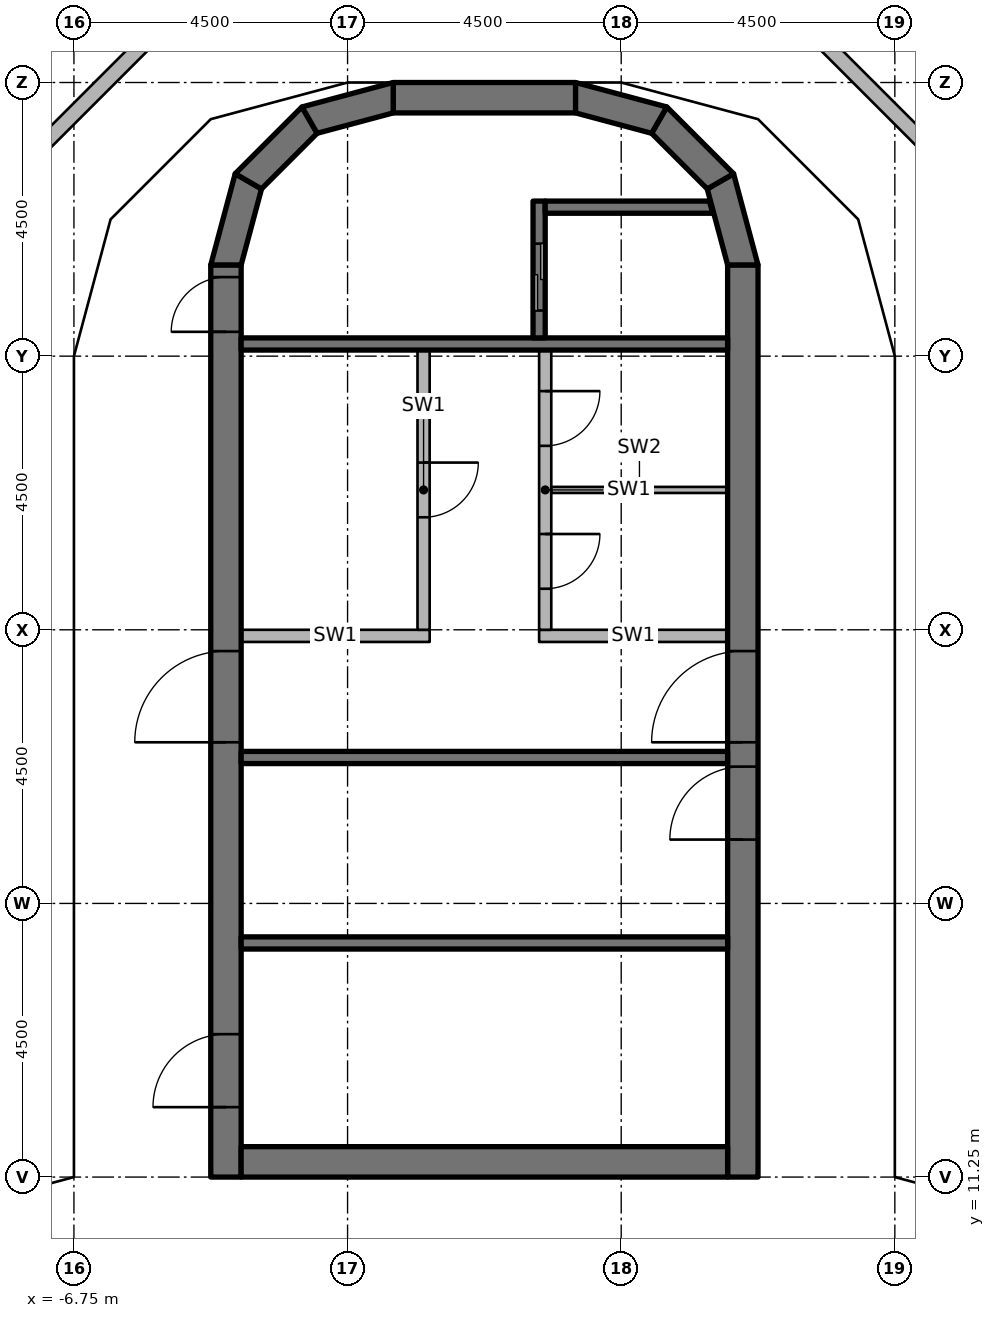
"""IFC4 building model, lengths in metres.
Left out: names, types, materials, properties, quantities, classifications, styles, units other than length and angle.
Written with IfcOpenShell. Run it as: python <this file> out.ifc"""

import sys

from ifc_helpers import new_model, si_unit, direction, frame, frame_2d, origin, origin_2d, place, context, subcontext, project, spatial, polyline, rectangle, outline, extrude, element, fill, save


model = new_model("IFC4")
c1 = context("Model", 3, precision=1e-05, world=origin(), true_north=direction((0.0, 1.0)))
c2 = subcontext(c1, "Body", "Model", "MODEL_VIEW")
j1 = project(units=[si_unit("LENGTHUNIT", "METRE"), si_unit("PLANEANGLEUNIT", "RADIAN")], contexts=[c1])
p1 = place(None, origin())
s1 = spatial("IfcSite", under=j1, at=p1, CompositionType="ELEMENT")
p2 = place(p1, origin())
s2 = spatial("IfcBuilding", under=s1, at=p2, CompositionType="ELEMENT")
p3 = place(p2, frame((0.0, 0.0, 298.8)))
s3 = spatial("IfcBuildingStorey", under=s2, at=p3, CompositionType="ELEMENT", Elevation=298.8)
for number, where, z_axis, x_axis in (
    (1, (-6.25, 10.75, 0.0), (0.0, 0.0, 1.0), (1.0, 0.0, 0.0)),
    (2, (-6.25, 15.75, 0.0), (0.0, 0.0, 1.0), (1.0, 0.0, 0.0)),
    (3, (-6.25, 20.25, 0.0), (0.0, 0.0, 1.0), (1.0, 0.0, 0.0)),
    (4, (-6.25, 24.65, 0.0), (0.0, 0.0, 1.0), (1.0, 0.0, 0.0)),
    (5, (6.25, 10.75, 0.0), (0.0, 0.0, 1.0), (1.0, 0.0, 0.0)),
    (6, (6.25, 15.75, 0.0), (0.0, 0.0, 1.0), (1.0, 0.0, 0.0)),
    (7, (6.25, 20.25, 0.0), (0.0, 0.0, 1.0), (1.0, 0.0, 0.0)),
    (8, (6.25, 24.65, 0.0), (0.0, 0.0, 1.0), (1.0, 0.0, 0.0)),
):
    element("IfcColumn", number, at=place(p3, frame(where, z_axis=z_axis, x_axis=x_axis)), inside=s3, PredefinedType="COLUMN", context=c2, shape_type="SweptSolid", body=[
        extrude(rectangle(XDim=0.6, YDim=0.6, at=origin_2d()), origin(), (0.0, 0.0, 1.0), 3.45),
    ])
p4 = place(p3, frame((-4.25, 11.25, 0.0), z_axis=(0.0, 0.0, 1.0), x_axis=(0.0, 1.0, 0.0)))
e9 = element("IfcWall", 9, at=p4, inside=s3, PredefinedType="SHEAR", context=c2, shape_type="SweptSolid", body=[
    extrude(rectangle(XDim=15.0, YDim=0.5, at=frame_2d((7.5, 0.0))), origin(), (0.0, 0.0, 1.0), 3.6),
])
p5 = place(p4, frame((7.15, 0.0, 0.0)))
e10 = element("IfcOpeningElement", 10, at=p5, cuts=e9, PredefinedType="OPENING", context=c2, shape_type="SweptSolid", body=[
    extrude(rectangle(XDim=1.5, YDim=2.3, at=frame_2d((0.75, 1.15))), frame((0.0, 0.26, 0.0), z_axis=(0.0, -1.0, 0.0), x_axis=(1.0, 0.0, 0.0)), (0.0, 0.0, 1.0), 0.52),
])
p6 = place(p4, frame((13.9, 0.0, 0.0)))
e11 = element("IfcOpeningElement", 11, at=p6, cuts=e9, PredefinedType="OPENING", context=c2, shape_type="SweptSolid", body=[
    extrude(rectangle(XDim=0.9, YDim=2.1, at=frame_2d((0.45, 1.05))), frame((0.0, 0.26, 0.0), z_axis=(0.0, -1.0, 0.0), x_axis=(1.0, 0.0, 0.0)), (0.0, 0.0, 1.0), 0.52),
])
p7 = place(p4, frame((1.15, 0.0, 0.0)))
e12 = element("IfcOpeningElement", 12, at=p7, cuts=e9, PredefinedType="OPENING", context=c2, shape_type="SweptSolid", body=[
    extrude(rectangle(XDim=1.2, YDim=2.1, at=frame_2d((0.6, 1.05))), frame((0.0, 0.26, 0.0), z_axis=(0.0, -1.0, 0.0), x_axis=(1.0, 0.0, 0.0)), (0.0, 0.0, 1.0), 0.52),
])
p8 = place(p3, frame((4.25, 11.25, 0.0), z_axis=(0.0, 0.0, 1.0), x_axis=(0.0, 1.0, 0.0)))
e13 = element("IfcWall", 13, at=p8, inside=s3, PredefinedType="SHEAR", context=c2, shape_type="SweptSolid", body=[
    extrude(rectangle(XDim=15.0, YDim=0.5, at=frame_2d((7.5, 0.0))), origin(), (0.0, 0.0, 1.0), 3.6),
])
p9 = place(p8, frame((7.15, 0.0, 0.0)))
e14 = element("IfcOpeningElement", 14, at=p9, cuts=e13, PredefinedType="OPENING", context=c2, shape_type="SweptSolid", body=[
    extrude(rectangle(XDim=1.5, YDim=2.3, at=frame_2d((0.75, 1.15))), frame((0.0, 0.26, 0.0), z_axis=(0.0, -1.0, 0.0), x_axis=(1.0, 0.0, 0.0)), (0.0, 0.0, 1.0), 0.52),
])
p10 = place(p8, frame((5.55, 0.0, 0.0)))
e15 = element("IfcOpeningElement", 15, at=p10, cuts=e13, PredefinedType="OPENING", context=c2, shape_type="SweptSolid", body=[
    extrude(rectangle(XDim=1.2, YDim=2.1, at=frame_2d((0.6, 1.05))), frame((0.0, 0.26, 0.0), z_axis=(0.0, -1.0, 0.0), x_axis=(1.0, 0.0, 0.0)), (0.0, 0.0, 1.0), 0.52),
])
p11 = place(p3, frame((-4.0, 11.5, 0.0), z_axis=(0.0, 0.0, 1.0), x_axis=(1.0, 0.0, 0.0)))
e16 = element("IfcWall", 16, at=p11, inside=s3, PredefinedType="SHEAR", context=c2, shape_type="SweptSolid", body=[
    extrude(rectangle(XDim=8.0, YDim=0.5, at=frame_2d((4.0, 0.0))), origin(), (0.0, 0.0, 1.0), 3.6),
])
p12 = place(p3, frame((-1.5, 29.0, 0.0), z_axis=(0.0, 0.0, 1.0), x_axis=(1.0, 0.0, 0.0)))
e17 = element("IfcWall", 17, at=p12, inside=s3, PredefinedType="SHEAR", context=c2, shape_type="SweptSolid", body=[
    extrude(rectangle(XDim=3.0, YDim=0.5, at=frame_2d((1.5, 0.0))), origin(), (0.0, 0.0, 1.0), 3.6),
])
p13 = place(p3, origin())
e18 = element("IfcWall", 18, at=p13, inside=s3, PredefinedType="SHEAR", context=c2, shape_type="SweptSolid", body=[
    extrude(outline(polyline([(-4.5, 26.25), (-4.098, 27.75), (-3.665, 27.5), (-4.0, 26.25), (-4.5, 26.25)])), origin(), (0.0, 0.0, 1.0), 3.6),
])
p14 = place(p3, origin())
e19 = element("IfcWall", 19, at=p14, inside=s3, PredefinedType="SHEAR", context=c2, shape_type="SweptSolid", body=[
    extrude(outline(polyline([(-4.098, 27.75), (-3.0, 28.848), (-2.75, 28.415), (-3.665, 27.5), (-4.098, 27.75)])), origin(), (0.0, 0.0, 1.0), 3.6),
])
p15 = place(p3, origin())
e20 = element("IfcWall", 20, at=p15, inside=s3, PredefinedType="SHEAR", context=c2, shape_type="SweptSolid", body=[
    extrude(outline(polyline([(-3.0, 28.848), (-1.5, 29.25), (-1.5, 28.75), (-2.75, 28.415), (-3.0, 28.848)])), origin(), (0.0, 0.0, 1.0), 3.6),
])
p16 = place(p3, origin())
e21 = element("IfcWall", 21, at=p16, inside=s3, PredefinedType="SHEAR", context=c2, shape_type="SweptSolid", body=[
    extrude(outline(polyline([(4.5, 26.25), (4.098, 27.75), (3.665, 27.5), (4.0, 26.25), (4.5, 26.25)])), origin(), (0.0, 0.0, 1.0), 3.6),
])
p17 = place(p3, origin())
e22 = element("IfcWall", 22, at=p17, inside=s3, PredefinedType="SHEAR", context=c2, shape_type="SweptSolid", body=[
    extrude(outline(polyline([(4.098, 27.75), (3.0, 28.848), (2.75, 28.415), (3.665, 27.5), (4.098, 27.75)])), origin(), (0.0, 0.0, 1.0), 3.6),
])
p18 = place(p3, origin())
e23 = element("IfcWall", 23, at=p18, inside=s3, PredefinedType="SHEAR", context=c2, shape_type="SweptSolid", body=[
    extrude(outline(polyline([(3.0, 28.848), (1.5, 29.25), (1.5, 28.75), (2.75, 28.415), (3.0, 28.848)])), origin(), (0.0, 0.0, 1.0), 3.6),
])
p19 = place(p3, origin())
e24 = element("IfcWall", 24, at=p19, inside=s3, PredefinedType="PARAPET", context=c2, shape_type="SweptSolid", body=[
    extrude(outline(polyline([(-7.743, 27.921), (-5.421, 30.243), (-5.292, 30.019), (-7.519, 27.792), (-7.743, 27.921)])), origin(), (0.0, 0.0, 1.0), 1.22),
])
p20 = place(p3, origin())
e25 = element("IfcWall", 25, at=p20, inside=s3, PredefinedType="PARAPET", context=c2, shape_type="SweptSolid", body=[
    extrude(outline(polyline([(5.421, 30.243), (7.743, 27.921), (7.519, 27.792), (5.292, 30.019), (5.421, 30.243)])), origin(), (0.0, 0.0, 1.0), 1.22),
])
p21 = place(p3, frame((-4.0, 24.95, 0.0), z_axis=(0.0, 0.0, 1.0), x_axis=(1.0, 0.0, 0.0)))
e26 = element("IfcWall", 26, at=p21, inside=s3, PredefinedType="SHEAR", context=c2, shape_type="SweptSolid", body=[
    extrude(rectangle(XDim=8.0, YDim=0.2, at=frame_2d((4.0, 0.0))), origin(), (0.0, 0.0, 1.0), 3.45),
])
p22 = place(p3, frame((0.9, 27.3, 0.0), z_axis=(0.0, 0.0, 1.0), x_axis=(0.0, -1.0, 0.0)))
e27 = element("IfcWall", 27, at=p22, inside=s3, PredefinedType="SHEAR", context=c2, shape_type="SweptSolid", body=[
    extrude(rectangle(XDim=2.25, YDim=0.2, at=frame_2d((1.125, 0.0))), origin(), (0.0, 0.0, 1.0), 3.45),
])
p23 = place(p22, frame((0.7, 0.0, 0.0)))
e28 = element("IfcOpeningElement", 28, at=p23, cuts=e27, PredefinedType="OPENING", context=c2, shape_type="SweptSolid", body=[
    extrude(rectangle(XDim=1.1, YDim=2.3, at=frame_2d((0.55, 1.15))), frame((0.0, 0.11, 0.0), z_axis=(0.0, -1.0, 0.0), x_axis=(1.0, 0.0, 0.0)), (0.0, 0.0, 1.0), 0.22),
])
p24 = place(p3, origin())
e29 = element("IfcWall", 29, at=p24, inside=s3, PredefinedType="SHEAR", context=c2, shape_type="SweptSolid", body=[
    extrude(outline(polyline([(1.0, 27.1), (3.755, 27.1), (3.701, 27.3), (1.0, 27.3), (1.0, 27.1)])), origin(), (0.0, 0.0, 1.0), 3.45),
])
for number, where, z_axis, x_axis in (
    (30, (-4.0, 18.15, 0.0), (0.0, 0.0, 1.0), (1.0, 0.0, 0.0)),
    (31, (-4.0, 15.1, 0.0), (0.0, 0.0, 1.0), (1.0, 0.0, 0.0)),
):
    element("IfcWall", number, at=place(p3, frame(where, z_axis=z_axis, x_axis=x_axis)), inside=s3, PredefinedType="SHEAR", context=c2, shape_type="SweptSolid", body=[
        extrude(rectangle(XDim=8.0, YDim=0.2, at=frame_2d((4.0, 0.0))), origin(), (0.0, 0.0, 1.0), 3.45),
    ])
p25 = place(p3, frame((-4.0, 20.15, 0.0), z_axis=(0.0, 0.0, 1.0), x_axis=(1.0, 0.0, 0.0)))
e32 = element("IfcWall", 32, at=p25, inside=s3, PredefinedType="PARTITIONING", context=c2, shape_type="SweptSolid", body=[
    extrude(rectangle(XDim=3.1, YDim=0.2, at=frame_2d((1.55, 0.0))), origin(), (0.0, 0.0, 1.0), 3.45),
])
p26 = place(p3, frame((-1.0, 24.85, 0.0), z_axis=(0.0, 0.0, 1.0), x_axis=(0.0, -1.0, 0.0)))
e33 = element("IfcWall", 33, at=p26, inside=s3, PredefinedType="PARTITIONING", context=c2, shape_type="SweptSolid", body=[
    extrude(rectangle(XDim=4.6, YDim=0.2, at=frame_2d((2.3, 0.0))), origin(), (0.0, 0.0, 1.0), 3.45),
])
p27 = place(p26, frame((1.85, 0.0, 0.0)))
e34 = element("IfcOpeningElement", 34, at=p27, cuts=e33, PredefinedType="OPENING", context=c2, shape_type="SweptSolid", body=[
    extrude(rectangle(XDim=0.9, YDim=2.1, at=frame_2d((0.45, 1.05))), frame((0.0, 0.11, 0.0), z_axis=(0.0, -1.0, 0.0), x_axis=(1.0, 0.0, 0.0)), (0.0, 0.0, 1.0), 0.22),
])
p28 = place(p3, frame((0.9, 20.15, 0.0), z_axis=(0.0, 0.0, 1.0), x_axis=(1.0, 0.0, 0.0)))
e35 = element("IfcWall", 35, at=p28, inside=s3, PredefinedType="PARTITIONING", context=c2, shape_type="SweptSolid", body=[
    extrude(rectangle(XDim=3.1, YDim=0.2, at=frame_2d((1.55, 0.0))), origin(), (0.0, 0.0, 1.0), 3.45),
])
p29 = place(p3, frame((1.0, 24.85, 0.0), z_axis=(0.0, 0.0, 1.0), x_axis=(0.0, -1.0, 0.0)))
e36 = element("IfcWall", 36, at=p29, inside=s3, PredefinedType="PARTITIONING", context=c2, shape_type="SweptSolid", body=[
    extrude(rectangle(XDim=4.6, YDim=0.2, at=frame_2d((2.3, 0.0))), origin(), (0.0, 0.0, 1.0), 3.45),
])
p30 = place(p29, frame((0.675, 0.0, 0.0)))
e37 = element("IfcOpeningElement", 37, at=p30, cuts=e36, PredefinedType="OPENING", context=c2, shape_type="SweptSolid", body=[
    extrude(rectangle(XDim=0.9, YDim=2.1, at=frame_2d((0.45, 1.05))), frame((0.0, 0.11, 0.0), z_axis=(0.0, -1.0, 0.0), x_axis=(1.0, 0.0, 0.0)), (0.0, 0.0, 1.0), 0.22),
])
p31 = place(p29, frame((3.025, 0.0, 0.0)))
e38 = element("IfcOpeningElement", 38, at=p31, cuts=e36, PredefinedType="OPENING", context=c2, shape_type="SweptSolid", body=[
    extrude(rectangle(XDim=0.9, YDim=2.1, at=frame_2d((0.45, 1.05))), frame((0.0, 0.11, 0.0), z_axis=(0.0, -1.0, 0.0), x_axis=(1.0, 0.0, 0.0)), (0.0, 0.0, 1.0), 0.22),
])
p32 = place(p3, frame((1.1, 22.55, 0.0), z_axis=(0.0, 0.0, 1.0), x_axis=(1.0, 0.0, 0.0)))
e39 = element("IfcWall", 39, at=p32, inside=s3, PredefinedType="PARTITIONING", context=c2, shape_type="SweptSolid", body=[
    extrude(rectangle(XDim=2.9, YDim=0.1, at=frame_2d((1.45, 0.0))), origin(), (0.0, 0.0, 1.0), 3.45),
])
p33 = place(p5, origin())
e40 = element("IfcDoor", 40, at=p33, inside=s3, OperationType="DOUBLE_DOOR_SINGLE_SWING", PredefinedType="DOOR", context=c2, shape_type="SweptSolid", body=[
    extrude(rectangle(XDim=1.5, YDim=2.3, at=frame_2d((0.75, 1.15))), frame((0.0, 0.025, 0.0), z_axis=(0.0, -1.0, 0.0), x_axis=(1.0, 0.0, 0.0)), (0.0, 0.0, 1.0), 0.05),
])
fill(e10, e40)
p34 = place(p9, origin())
e41 = element("IfcDoor", 41, at=p34, inside=s3, OperationType="DOUBLE_DOOR_SINGLE_SWING", PredefinedType="DOOR", context=c2, shape_type="SweptSolid", body=[
    extrude(rectangle(XDim=1.5, YDim=2.3, at=frame_2d((0.75, 1.15))), frame((0.0, 0.025, 0.0), z_axis=(0.0, -1.0, 0.0), x_axis=(1.0, 0.0, 0.0)), (0.0, 0.0, 1.0), 0.05),
])
fill(e14, e41)
p35 = place(p6, origin())
e42 = element("IfcDoor", 42, at=p35, inside=s3, OperationType="SINGLE_SWING_LEFT", PredefinedType="DOOR", context=c2, shape_type="SweptSolid", body=[
    extrude(rectangle(XDim=0.9, YDim=2.1, at=frame_2d((0.45, 1.05))), frame((0.0, 0.025, 0.0), z_axis=(0.0, -1.0, 0.0), x_axis=(1.0, 0.0, 0.0)), (0.0, 0.0, 1.0), 0.05),
])
fill(e11, e42)
p36 = place(p10, origin())
e43 = element("IfcDoor", 43, at=p36, inside=s3, OperationType="SINGLE_SWING_LEFT", PredefinedType="DOOR", context=c2, shape_type="SweptSolid", body=[
    extrude(rectangle(XDim=1.2, YDim=2.1, at=frame_2d((0.6, 1.05))), frame((0.0, 0.025, 0.0), z_axis=(0.0, -1.0, 0.0), x_axis=(1.0, 0.0, 0.0)), (0.0, 0.0, 1.0), 0.05),
])
fill(e15, e43)
p37 = place(p7, origin())
e44 = element("IfcDoor", 44, at=p37, inside=s3, OperationType="SINGLE_SWING_LEFT", PredefinedType="DOOR", context=c2, shape_type="SweptSolid", body=[
    extrude(rectangle(XDim=1.2, YDim=2.1, at=frame_2d((0.6, 1.05))), frame((0.0, 0.025, 0.0), z_axis=(0.0, -1.0, 0.0), x_axis=(1.0, 0.0, 0.0)), (0.0, 0.0, 1.0), 0.05),
])
fill(e12, e44)
p38 = place(p23, origin())
e45 = element("IfcDoor", 45, at=p38, inside=s3, OperationType="DOUBLE_DOOR_SLIDING", PredefinedType="DOOR", context=c2, shape_type="SweptSolid", body=[
    extrude(rectangle(XDim=1.1, YDim=2.3, at=frame_2d((0.55, 1.15))), frame((0.0, 0.025, 0.0), z_axis=(0.0, -1.0, 0.0), x_axis=(1.0, 0.0, 0.0)), (0.0, 0.0, 1.0), 0.05),
])
fill(e28, e45)
p39 = place(p27, origin())
e46 = element("IfcDoor", 46, at=p39, inside=s3, OperationType="SINGLE_SWING_LEFT", PredefinedType="DOOR", context=c2, shape_type="SweptSolid", body=[
    extrude(rectangle(XDim=0.9, YDim=2.1, at=frame_2d((0.45, 1.05))), frame((0.0, 0.025, 0.0), z_axis=(0.0, -1.0, 0.0), x_axis=(1.0, 0.0, 0.0)), (0.0, 0.0, 1.0), 0.05),
])
fill(e34, e46)
p40 = place(p30, origin())
e47 = element("IfcDoor", 47, at=p40, inside=s3, OperationType="SINGLE_SWING_RIGHT", PredefinedType="DOOR", context=c2, shape_type="SweptSolid", body=[
    extrude(rectangle(XDim=0.9, YDim=2.1, at=frame_2d((0.45, 1.05))), frame((0.0, 0.025, 0.0), z_axis=(0.0, -1.0, 0.0), x_axis=(1.0, 0.0, 0.0)), (0.0, 0.0, 1.0), 0.05),
])
fill(e37, e47)
p41 = place(p31, origin())
e48 = element("IfcDoor", 48, at=p41, inside=s3, OperationType="SINGLE_SWING_RIGHT", PredefinedType="DOOR", context=c2, shape_type="SweptSolid", body=[
    extrude(rectangle(XDim=0.9, YDim=2.1, at=frame_2d((0.45, 1.05))), frame((0.0, 0.025, 0.0), z_axis=(0.0, -1.0, 0.0), x_axis=(1.0, 0.0, 0.0)), (0.0, 0.0, 1.0), 0.05),
])
fill(e38, e48)
save(model, sys.argv[1])
